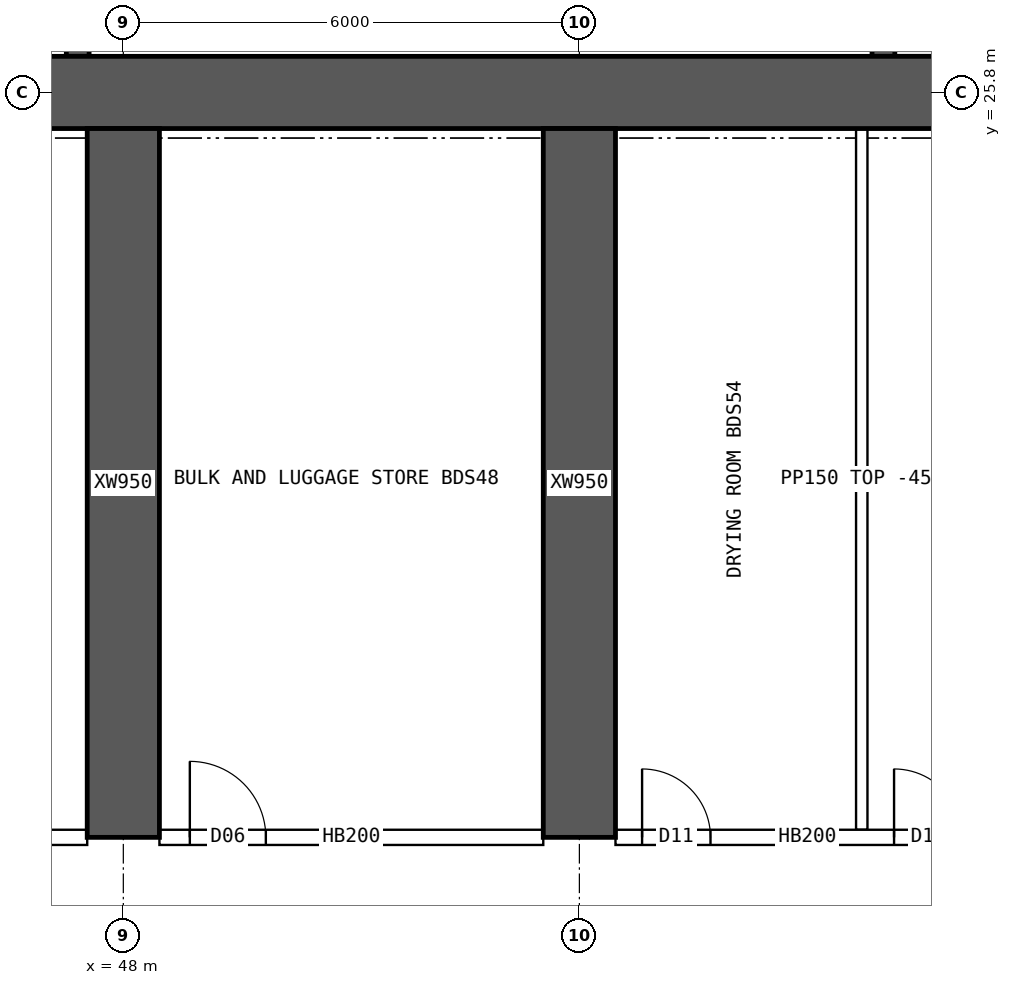
"""IFC4 building model, lengths in metres.
Left out: names, types, materials, properties, quantities, classifications, styles, units other than length and angle.
Written with IfcOpenShell. Run it as: python <this file> out.ifc"""

import sys

from ifc_helpers import new_model, si_unit, direction, frame, frame_2d, origin, place, context, subcontext, project, spatial, rectangle, extrude, element, fill, save


model = new_model("IFC4")
c1 = context("Model", 3, precision=1e-05, world=origin(), true_north=direction((0.0, 1.0)))
c2 = subcontext(c1, "Body", "Model", "MODEL_VIEW")
j1 = project(units=[si_unit("LENGTHUNIT", "METRE"), si_unit("PLANEANGLEUNIT", "RADIAN")], contexts=[c1])
p1 = place(None, origin())
s1 = spatial("IfcSite", under=j1, at=p1, CompositionType="ELEMENT")
p2 = place(p1, origin())
s2 = spatial("IfcBuilding", under=s1, at=p2, CompositionType="ELEMENT")
p3 = place(p2, frame((0.0, 0.0, 80.65)))
s3 = spatial("IfcBuildingStorey", under=s2, at=p3, CompositionType="ELEMENT", Elevation=80.65)
p4 = place(p3, frame((18.0, 25.8, 0.0), z_axis=(0.0, 0.0, 1.0), x_axis=(1.0, 0.0, 0.0)))
e1 = element("IfcWall", 1, at=p4, inside=s3, PredefinedType="SHEAR", context=c2, shape_type="SweptSolid", body=[
    extrude(rectangle(XDim=48.0, YDim=0.95, at=frame_2d((24.0, 0.0))), origin(), (0.0, 0.0, 1.0), 3.75),
])
for number, where, z_axis, x_axis in (
    (2, (58.0, 26.275, 0.0), (0.0, 0.0, 1.0), (0.0, 1.0, 0.0)),
    (3, (47.4, 26.275, 0.0), (0.0, 0.0, 1.0), (0.0, 1.0, 0.0)),
):
    element("IfcWall", number, at=place(p3, frame(where, z_axis=z_axis, x_axis=x_axis)), inside=s3, PredefinedType="SHEAR", context=c2, shape_type="SweptSolid", body=[
        extrude(rectangle(XDim=3.975, YDim=0.3, at=frame_2d((1.988, 0.0))), origin(), (0.0, 0.0, 1.0), 3.75),
    ])
for number, where, z_axis, x_axis in (
    (4, (48.0, 16.0, 0.0), (0.0, 0.0, 1.0), (0.0, 1.0, 0.0)),
    (5, (54.0, 16.0, 0.0), (0.0, 0.0, 1.0), (0.0, 1.0, 0.0)),
):
    element("IfcWall", number, at=place(p3, frame(where, z_axis=z_axis, x_axis=x_axis)), inside=s3, PredefinedType="SHEAR", context=c2, shape_type="SweptSolid", body=[
        extrude(rectangle(XDim=9.325, YDim=0.95, at=frame_2d((4.663, 0.0))), origin(), (0.0, 0.0, 1.0), 3.75),
    ])
p5 = place(p3, frame((42.475, 16.0, 0.0), z_axis=(0.0, 0.0, 1.0), x_axis=(1.0, 0.0, 0.0)))
e6 = element("IfcWall", 6, at=p5, inside=s3, PredefinedType="SOLIDWALL", context=c2, shape_type="SweptSolid", body=[
    extrude(rectangle(XDim=5.05, YDim=0.2, at=frame_2d((2.525, 0.0))), origin(), (0.0, 0.0, 1.0), 3.3),
])
p6 = place(p5, frame((0.35, 0.0, 0.0)))
e7 = element("IfcOpeningElement", 7, at=p6, cuts=e6, PredefinedType="OPENING", context=c2, shape_type="SweptSolid", body=[
    extrude(rectangle(XDim=0.9, YDim=2.1, at=frame_2d((0.45, 1.05))), frame((0.0, 0.11, 0.0), z_axis=(0.0, -1.0, 0.0), x_axis=(1.0, 0.0, 0.0)), (0.0, 0.0, 1.0), 0.22),
])
p7 = place(p5, frame((2.705, 0.0, 0.0)))
e8 = element("IfcOpeningElement", 8, at=p7, cuts=e6, PredefinedType="OPENING", context=c2, shape_type="SweptSolid", body=[
    extrude(rectangle(XDim=0.9, YDim=2.1, at=frame_2d((0.45, 1.05))), frame((0.0, 0.11, 0.0), z_axis=(0.0, -1.0, 0.0), x_axis=(1.0, 0.0, 0.0)), (0.0, 0.0, 1.0), 0.22),
])
p8 = place(p3, frame((48.475, 16.0, 0.0), z_axis=(0.0, 0.0, 1.0), x_axis=(1.0, 0.0, 0.0)))
e9 = element("IfcWall", 9, at=p8, inside=s3, PredefinedType="SOLIDWALL", context=c2, shape_type="SweptSolid", body=[
    extrude(rectangle(XDim=5.05, YDim=0.2, at=frame_2d((2.525, 0.0))), origin(), (0.0, 0.0, 1.0), 3.3),
])
p9 = place(p8, frame((0.4, 0.0, 0.0)))
e10 = element("IfcOpeningElement", 10, at=p9, cuts=e9, PredefinedType="OPENING", context=c2, shape_type="SweptSolid", body=[
    extrude(rectangle(XDim=1.0, YDim=2.1, at=frame_2d((0.5, 1.05))), frame((0.0, 0.11, 0.0), z_axis=(0.0, -1.0, 0.0), x_axis=(1.0, 0.0, 0.0)), (0.0, 0.0, 1.0), 0.22),
])
p10 = place(p3, frame((54.475, 16.0, 0.0), z_axis=(0.0, 0.0, 1.0), x_axis=(1.0, 0.0, 0.0)))
e11 = element("IfcWall", 11, at=p10, inside=s3, PredefinedType="SOLIDWALL", context=c2, shape_type="SweptSolid", body=[
    extrude(rectangle(XDim=5.05, YDim=0.2, at=frame_2d((2.525, 0.0))), origin(), (0.0, 0.0, 1.0), 3.3),
])
p11 = place(p10, frame((0.35, 0.0, 0.0)))
e12 = element("IfcOpeningElement", 12, at=p11, cuts=e11, PredefinedType="OPENING", context=c2, shape_type="SweptSolid", body=[
    extrude(rectangle(XDim=0.9, YDim=2.1, at=frame_2d((0.45, 1.05))), frame((0.0, 0.11, 0.0), z_axis=(0.0, -1.0, 0.0), x_axis=(1.0, 0.0, 0.0)), (0.0, 0.0, 1.0), 0.22),
])
p12 = place(p10, frame((3.665, 0.0, 0.0)))
e13 = element("IfcOpeningElement", 13, at=p12, cuts=e11, PredefinedType="OPENING", context=c2, shape_type="SweptSolid", body=[
    extrude(rectangle(XDim=0.9, YDim=2.1, at=frame_2d((0.45, 1.05))), frame((0.0, 0.11, 0.0), z_axis=(0.0, -1.0, 0.0), x_axis=(1.0, 0.0, 0.0)), (0.0, 0.0, 1.0), 0.22),
])
p13 = place(p3, frame((57.715, 16.1, 0.0), z_axis=(0.0, 0.0, 1.0), x_axis=(0.0, 1.0, 0.0)))
e14 = element("IfcWall", 14, at=p13, inside=s3, PredefinedType="PARTITIONING", context=c2, shape_type="SweptSolid", body=[
    extrude(rectangle(XDim=9.225, YDim=0.15, at=frame_2d((4.612, 0.0))), origin(), (0.0, 0.0, 1.0), 3.3),
])
p14 = place(p9, origin())
e15 = element("IfcDoor", 15, at=p14, inside=s3, OperationType="SINGLE_SWING_LEFT", PredefinedType="DOOR", context=c2, shape_type="SweptSolid", body=[
    extrude(rectangle(XDim=1.0, YDim=2.1, at=frame_2d((0.5, 1.05))), frame((0.0, 0.025, 0.0), z_axis=(0.0, -1.0, 0.0), x_axis=(1.0, 0.0, 0.0)), (0.0, 0.0, 1.0), 0.05),
])
fill(e10, e15)
p15 = place(p11, origin())
e16 = element("IfcDoor", 16, at=p15, inside=s3, OperationType="SINGLE_SWING_LEFT", PredefinedType="DOOR", context=c2, shape_type="SweptSolid", body=[
    extrude(rectangle(XDim=0.9, YDim=2.1, at=frame_2d((0.45, 1.05))), frame((0.0, 0.025, 0.0), z_axis=(0.0, -1.0, 0.0), x_axis=(1.0, 0.0, 0.0)), (0.0, 0.0, 1.0), 0.05),
])
fill(e12, e16)
p16 = place(p12, origin())
e17 = element("IfcDoor", 17, at=p16, inside=s3, OperationType="SINGLE_SWING_LEFT", PredefinedType="DOOR", context=c2, shape_type="SweptSolid", body=[
    extrude(rectangle(XDim=0.9, YDim=2.1, at=frame_2d((0.45, 1.05))), frame((0.0, 0.025, 0.0), z_axis=(0.0, -1.0, 0.0), x_axis=(1.0, 0.0, 0.0)), (0.0, 0.0, 1.0), 0.05),
])
fill(e13, e17)
save(model, sys.argv[1])
